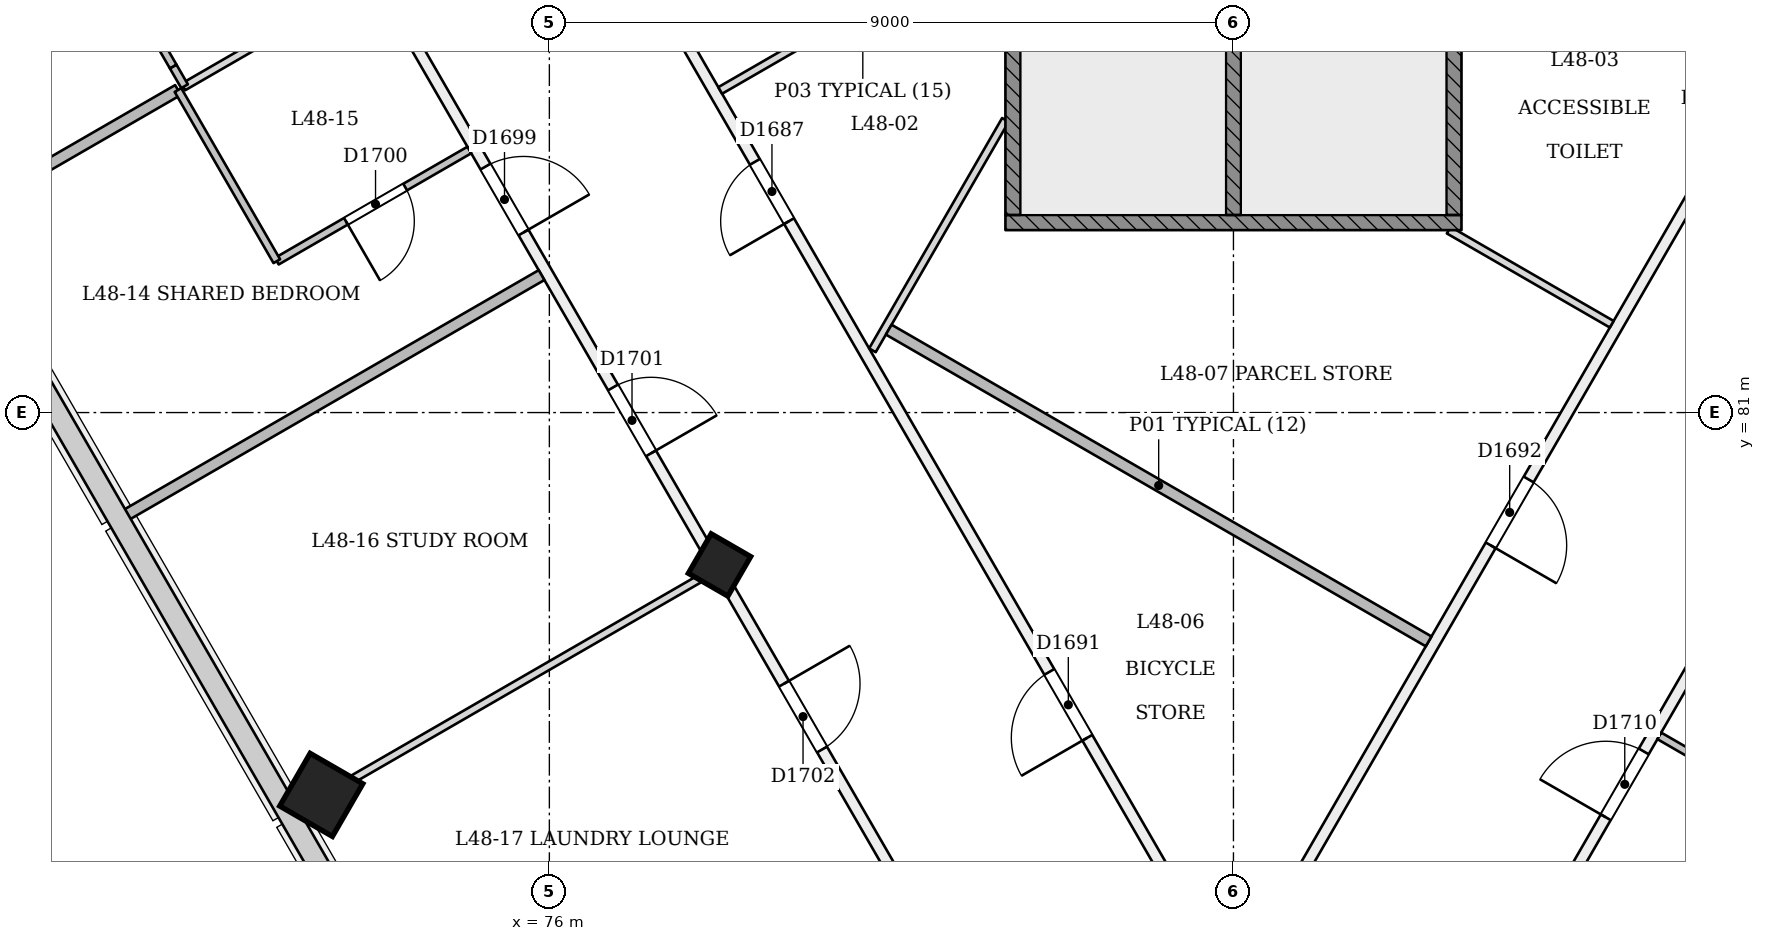
"""IFC4 building model, lengths in metres.
Left out: names, types, materials, properties, quantities, classifications, styles, units other than length and angle.
Written with IfcOpenShell. Run it as: python <this file> out.ifc"""

import sys

from ifc_helpers import new_model, si_unit, direction, frame, frame_2d, origin, origin_2d, place, context, subcontext, project, spatial, rectangle, extrude, element, fill, save


model = new_model("IFC4")
c1 = context("Model", 3, precision=1e-05, world=origin(), true_north=direction((0.0, 1.0)))
c2 = subcontext(c1, "Body", "Model", "MODEL_VIEW")
j1 = project(units=[si_unit("LENGTHUNIT", "METRE"), si_unit("PLANEANGLEUNIT", "RADIAN")], contexts=[c1])
p1 = place(None, origin())
s1 = spatial("IfcSite", under=j1, at=p1, CompositionType="ELEMENT")
p2 = place(p1, origin())
s2 = spatial("IfcBuilding", under=s1, at=p2, CompositionType="ELEMENT")
p3 = place(p2, frame((0.0, 0.0, 185.4)))
s3 = spatial("IfcBuildingStorey", under=s2, at=p3, CompositionType="ELEMENT", Elevation=185.4)
p4 = place(p3, frame((78.212, 78.948, -0.018), z_axis=(0.022222910879, 0.038415824599, 0.999014697916), x_axis=(-0.866018645871, -0.498532312818, 0.038434855016)))
e1 = element("IfcColumn", 1, at=p4, inside=s3, PredefinedType="COLUMN", context=c2, shape_type="SweptSolid", body=[
    extrude(rectangle(XDim=0.6, YDim=0.6, at=origin_2d()), origin(), (0.0, 0.0, 1.0), 3.604),
])
p5 = place(p3, frame((72.972, 75.923, -0.024), z_axis=(0.02220780257, 0.038426228083, 0.999014633777), x_axis=(-0.8658131381, -0.498889041499, 0.038436104969)))
e2 = element("IfcColumn", 2, at=p5, inside=s3, PredefinedType="COLUMN", context=c2, shape_type="SweptSolid", body=[
    extrude(rectangle(XDim=0.8, YDim=0.8, at=origin_2d()), origin(), (0.0, 0.0, 1.0), 3.628),
])
p6 = place(p3, frame((85.0, 73.392, 0.0), z_axis=(0.0, 0.0, 1.0), x_axis=(-0.500003025806, 0.866023656828, 0.0)))
e3 = element("IfcWall", 3, at=p6, inside=s3, PredefinedType="PARTITIONING", context=c2, shape_type="SweptSolid", body=[
    extrude(rectangle(XDim=19.408, YDim=0.15, at=frame_2d((9.704, 0.0))), origin(), (0.0, 0.0, 1.0), 3.3),
])
p7 = place(p6, frame((11.693, 0.0, 0.0)))
e4 = element("IfcOpeningElement", 4, at=p7, cuts=e3, PredefinedType="OPENING", context=c2, shape_type="SweptSolid", body=[
    extrude(rectangle(XDim=0.9, YDim=2.1, at=frame_2d((0.45, 1.05))), frame((0.0, 0.085, 0.0), z_axis=(0.0, -1.0, 0.0), x_axis=(1.0, 0.0, 0.0)), (0.0, 0.0, 1.0), 0.171),
])
p8 = place(p6, frame((15.402, 0.0, 0.0)))
e5 = element("IfcOpeningElement", 5, at=p8, cuts=e3, PredefinedType="OPENING", context=c2, shape_type="SweptSolid", body=[
    extrude(rectangle(XDim=1.0, YDim=2.1, at=frame_2d((0.5, 1.05))), frame((0.0, 0.085, 0.0), z_axis=(0.0, -1.0, 0.0), x_axis=(1.0, 0.0, 0.0)), (0.0, 0.0, 1.0), 0.171),
])
p9 = place(p6, frame((3.845, 0.0, 0.0)))
e6 = element("IfcOpeningElement", 6, at=p9, cuts=e3, PredefinedType="OPENING", context=c2, shape_type="SweptSolid", body=[
    extrude(rectangle(XDim=1.0, YDim=2.1, at=frame_2d((0.5, 1.05))), frame((0.0, 0.085, 0.0), z_axis=(0.0, -1.0, 0.0), x_axis=(1.0, 0.0, 0.0)), (0.0, 0.0, 1.0), 0.171),
])
p10 = place(p3, frame((94.704, 90.2, 0.0), z_axis=(0.0, 0.0, 1.0), x_axis=(-0.500004551397, -0.866022776018, 0.0)))
e7 = element("IfcWall", 7, at=p10, inside=s3, PredefinedType="PARTITIONING", context=c2, shape_type="SweptSolid", body=[
    extrude(rectangle(XDim=19.278, YDim=0.15, at=frame_2d((9.639, 0.0))), origin(), (0.0, 0.0, 1.0), 3.3),
])
p11 = place(p10, frame((6.339, 0.0, 0.0)))
e8 = element("IfcOpeningElement", 8, at=p11, cuts=e7, PredefinedType="OPENING", context=c2, shape_type="SweptSolid", body=[
    extrude(rectangle(XDim=0.9, YDim=2.1, at=frame_2d((0.45, 1.05))), frame((0.0, 0.085, 0.0), z_axis=(0.0, -1.0, 0.0), x_axis=(1.0, 0.0, 0.0)), (0.0, 0.0, 1.0), 0.171),
])
p12 = place(p10, frame((2.541, 0.0, 0.0)))
e9 = element("IfcOpeningElement", 9, at=p12, cuts=e7, PredefinedType="OPENING", context=c2, shape_type="SweptSolid", body=[
    extrude(rectangle(XDim=1.0, YDim=2.1, at=frame_2d((0.5, 1.05))), frame((0.0, 0.085, 0.0), z_axis=(0.0, -1.0, 0.0), x_axis=(1.0, 0.0, 0.0)), (0.0, 0.0, 1.0), 0.171),
])
p13 = place(p10, frame((11.64, 0.0, 0.0)))
e10 = element("IfcOpeningElement", 10, at=p13, cuts=e7, PredefinedType="OPENING", context=c2, shape_type="SweptSolid", body=[
    extrude(rectangle(XDim=1.0, YDim=2.1, at=frame_2d((0.5, 1.05))), frame((0.0, 0.085, 0.0), z_axis=(0.0, -1.0, 0.0), x_axis=(1.0, 0.0, 0.0)), (0.0, 0.0, 1.0), 0.171),
])
p14 = place(p3, frame((71.716, 90.2, 0.0), z_axis=(0.0, 0.0, 1.0), x_axis=(0.500001662319, -0.866024444042, 0.0)))
e11 = element("IfcWall", 11, at=p14, inside=s3, PredefinedType="PARTITIONING", context=c2, shape_type="SweptSolid", body=[
    extrude(rectangle(XDim=26.492, YDim=0.15, at=frame_2d((13.246, 0.0))), origin(), (0.0, 0.0, 1.0), 2.9),
])
p15 = place(p14, frame((0.23, 0.0, 0.0)))
e12 = element("IfcOpeningElement", 12, at=p15, cuts=e11, PredefinedType="OPENING", context=c2, shape_type="SweptSolid", body=[
    extrude(rectangle(XDim=1.0, YDim=2.1, at=frame_2d((0.5, 1.05))), frame((0.0, 0.085, 0.0), z_axis=(0.0, -1.0, 0.0), x_axis=(1.0, 0.0, 0.0)), (0.0, 0.0, 1.0), 0.171),
])
p16 = place(p14, frame((6.887, 0.0, 0.0)))
e13 = element("IfcOpeningElement", 13, at=p16, cuts=e11, PredefinedType="OPENING", context=c2, shape_type="SweptSolid", body=[
    extrude(rectangle(XDim=1.0, YDim=2.1, at=frame_2d((0.5, 1.05))), frame((0.0, 0.085, 0.0), z_axis=(0.0, -1.0, 0.0), x_axis=(1.0, 0.0, 0.0)), (0.0, 0.0, 1.0), 0.171),
])
p17 = place(p14, frame((10.242, 0.0, 0.0)))
e14 = element("IfcOpeningElement", 14, at=p17, cuts=e11, PredefinedType="OPENING", context=c2, shape_type="SweptSolid", body=[
    extrude(rectangle(XDim=1.0, YDim=2.1, at=frame_2d((0.5, 1.05))), frame((0.0, 0.085, 0.0), z_axis=(0.0, -1.0, 0.0), x_axis=(1.0, 0.0, 0.0)), (0.0, 0.0, 1.0), 0.171),
])
p18 = place(p14, frame((14.742, 0.0, 0.0)))
e15 = element("IfcOpeningElement", 15, at=p18, cuts=e11, PredefinedType="OPENING", context=c2, shape_type="SweptSolid", body=[
    extrude(rectangle(XDim=1.0, YDim=2.1, at=frame_2d((0.5, 1.05))), frame((0.0, 0.085, 0.0), z_axis=(0.0, -1.0, 0.0), x_axis=(1.0, 0.0, 0.0)), (0.0, 0.0, 1.0), 0.171),
])
p19 = place(p14, frame((18.212, 0.0, 0.0)))
e16 = element("IfcOpeningElement", 16, at=p19, cuts=e11, PredefinedType="OPENING", context=c2, shape_type="SweptSolid", body=[
    extrude(rectangle(XDim=1.0, YDim=2.1, at=frame_2d((0.5, 1.05))), frame((0.0, 0.085, 0.0), z_axis=(0.0, -1.0, 0.0), x_axis=(1.0, 0.0, 0.0)), (0.0, 0.0, 1.0), 0.171),
])
p20 = place(p14, frame((24.771, 0.0, 0.0)))
e17 = element("IfcOpeningElement", 17, at=p20, cuts=e11, PredefinedType="OPENING", context=c2, shape_type="SweptSolid", body=[
    extrude(rectangle(XDim=1.0, YDim=2.1, at=frame_2d((0.5, 1.05))), frame((0.0, 0.085, 0.0), z_axis=(0.0, -1.0, 0.0), x_axis=(1.0, 0.0, 0.0)), (0.0, 0.0, 1.0), 0.171),
])
p21 = place(p3, frame((85.076, 67.323, 0.0), z_axis=(0.0, 0.0, 1.0), x_axis=(0.499999794657, 0.866025522339, 0.0)))
e18 = element("IfcWall", 18, at=p21, inside=s3, PredefinedType="PARTITIONING", context=c2, shape_type="SweptSolid", body=[
    extrude(rectangle(XDim=26.416, YDim=0.15, at=frame_2d((13.208, 0.0))), origin(), (0.0, 0.0, 1.0), 2.9),
])
p22 = place(p21, frame((0.457, 0.0, 0.0)))
e19 = element("IfcOpeningElement", 19, at=p22, cuts=e18, PredefinedType="OPENING", context=c2, shape_type="SweptSolid", body=[
    extrude(rectangle(XDim=1.2, YDim=2.1, at=frame_2d((0.6, 1.05))), frame((0.0, 0.085, 0.0), z_axis=(0.0, -1.0, 0.0), x_axis=(1.0, 0.0, 0.0)), (0.0, 0.0, 1.0), 0.171),
])
p23 = place(p21, frame((7.32, 0.0, 0.0)))
e20 = element("IfcOpeningElement", 20, at=p23, cuts=e18, PredefinedType="OPENING", context=c2, shape_type="SweptSolid", body=[
    extrude(rectangle(XDim=1.0, YDim=2.1, at=frame_2d((0.5, 1.05))), frame((0.0, 0.085, 0.0), z_axis=(0.0, -1.0, 0.0), x_axis=(1.0, 0.0, 0.0)), (0.0, 0.0, 1.0), 0.171),
])
p24 = place(p21, frame((9.645, 0.0, 0.0)))
e21 = element("IfcOpeningElement", 21, at=p24, cuts=e18, PredefinedType="OPENING", context=c2, shape_type="SweptSolid", body=[
    extrude(rectangle(XDim=1.0, YDim=2.1, at=frame_2d((0.5, 1.05))), frame((0.0, 0.085, 0.0), z_axis=(0.0, -1.0, 0.0), x_axis=(1.0, 0.0, 0.0)), (0.0, 0.0, 1.0), 0.171),
])
p25 = place(p21, frame((16.204, 0.0, 0.0)))
e22 = element("IfcOpeningElement", 22, at=p25, cuts=e18, PredefinedType="OPENING", context=c2, shape_type="SweptSolid", body=[
    extrude(rectangle(XDim=1.0, YDim=2.1, at=frame_2d((0.5, 1.05))), frame((0.0, 0.085, 0.0), z_axis=(0.0, -1.0, 0.0), x_axis=(1.0, 0.0, 0.0)), (0.0, 0.0, 1.0), 0.171),
])
p26 = place(p21, frame((18.645, 0.0, 0.0)))
e23 = element("IfcOpeningElement", 23, at=p26, cuts=e18, PredefinedType="OPENING", context=c2, shape_type="SweptSolid", body=[
    extrude(rectangle(XDim=1.0, YDim=2.1, at=frame_2d((0.5, 1.05))), frame((0.0, 0.085, 0.0), z_axis=(0.0, -1.0, 0.0), x_axis=(1.0, 0.0, 0.0)), (0.0, 0.0, 1.0), 0.171),
])
p27 = place(p21, frame((24.158, 0.0, 0.0)))
e24 = element("IfcOpeningElement", 24, at=p27, cuts=e18, PredefinedType="OPENING", context=c2, shape_type="SweptSolid", body=[
    extrude(rectangle(XDim=1.0, YDim=2.1, at=frame_2d((0.5, 1.05))), frame((0.0, 0.085, 0.0), z_axis=(0.0, -1.0, 0.0), x_axis=(1.0, 0.0, 0.0)), (0.0, 0.0, 1.0), 0.171),
])
p28 = place(p3, frame((82.0, 87.404, 0.0), z_axis=(0.0, 0.0, 1.0), x_axis=(-0.866022320763, -0.500005339912, 0.0)))
e25 = element("IfcWall", 25, at=p28, inside=s3, PredefinedType="PARTITIONING", context=c2, shape_type="SweptSolid", body=[
    extrude(rectangle(XDim=4.333, YDim=0.1, at=frame_2d((2.167, 0.0))), origin(), (0.0, 0.0, 1.0), 3.3),
])
p29 = place(p3, frame((80.25, 81.819, 0.0), z_axis=(0.0, 0.0, 1.0), x_axis=(0.499988162555, 0.866032238029, 0.0)))
e26 = element("IfcWall", 26, at=p29, inside=s3, PredefinedType="PARTITIONING", context=c2, shape_type="SweptSolid", body=[
    extrude(rectangle(XDim=3.5, YDim=0.1, at=frame_2d((1.75, 0.0))), origin(), (0.0, 0.0, 1.0), 3.3),
])
p30 = place(p3, frame((87.832, 83.4, 0.0), z_axis=(0.0, 0.0, 1.0), x_axis=(0.866019742871, -0.500009804862, 0.0)))
e27 = element("IfcWall", 27, at=p30, inside=s3, PredefinedType="PARTITIONING", context=c2, shape_type="SweptSolid", body=[
    extrude(rectangle(XDim=2.476, YDim=0.1, at=frame_2d((1.238, 0.0))), origin(), (0.0, 0.0, 1.0), 3.3),
])
p31 = place(p3, frame((87.568, 77.99, 0.0), z_axis=(0.0, 0.0, 1.0), x_axis=(-0.866018040531, 0.500012753312, 0.0)))
e28 = element("IfcWall", 28, at=p31, inside=s3, PredefinedType="PARTITIONING", context=c2, shape_type="SweptSolid", body=[
    extrude(rectangle(XDim=8.202, YDim=0.15, at=frame_2d((4.101, 0.0))), origin(), (0.0, 0.0, 1.0), 3.3),
])
p32 = place(p3, frame((71.201, 85.293, 0.0), z_axis=(0.0, 0.0, 1.0), x_axis=(-0.499816412211, 0.866131372301, 0.0)))
e29 = element("IfcWall", 29, at=p32, inside=s3, PredefinedType="PARTITIONING", context=c2, shape_type="SweptSolid", body=[
    extrude(rectangle(XDim=0.3, YDim=0.1, at=frame_2d((0.15, 0.0))), origin(), (0.0, 0.0, 1.0), 2.9),
])
p33 = place(p3, frame((71.051, 85.553, 0.0), z_axis=(0.0, 0.0, 1.0), x_axis=(-0.50002983664, 0.866008176907, 0.0)))
e30 = element("IfcWall", 30, at=p33, inside=s3, PredefinedType="PARTITIONING", context=c2, shape_type="SweptSolid", body=[
    extrude(rectangle(XDim=2.2, YDim=0.1, at=frame_2d((1.1, 0.0))), origin(), (0.0, 0.0, 1.0), 3.3),
])
p34 = place(p3, frame((68.17, 83.543, 0.0), z_axis=(0.0, 0.0, 1.0), x_axis=(0.866020560687, 0.500008388397, 0.0)))
e31 = element("IfcWall", 31, at=p34, inside=s3, PredefinedType="PARTITIONING", context=c2, shape_type="SweptSolid", body=[
    extrude(rectangle(XDim=3.4, YDim=0.15, at=frame_2d((1.7, 0.0))), origin(), (0.0, 0.0, 1.0), 2.9),
])
p35 = place(p3, frame((71.183, 85.283, 0.0), z_axis=(0.0, 0.0, 1.0), x_axis=(0.866048401274, 0.499960165064, 0.0)))
e32 = element("IfcWall", 32, at=p35, inside=s3, PredefinedType="PARTITIONING", context=c2, shape_type="SweptSolid", body=[
    extrude(rectangle(XDim=2.845, YDim=0.1, at=frame_2d((1.422, 0.0))), origin(), (0.0, 0.0, 1.0), 2.9),
])
p36 = place(p3, frame((74.947, 84.454, 0.0), z_axis=(0.0, 0.0, 1.0), x_axis=(-0.86601045545, -0.500025890382, 0.0)))
e33 = element("IfcWall", 33, at=p36, inside=s3, PredefinedType="PARTITIONING", context=c2, shape_type="SweptSolid", body=[
    extrude(rectangle(XDim=2.925, YDim=0.1, at=frame_2d((1.462, 0.0))), origin(), (0.0, 0.0, 1.0), 3.3),
])
p37 = place(p36, frame((0.975, 0.0, 0.0)))
e34 = element("IfcOpeningElement", 34, at=p37, cuts=e33, PredefinedType="OPENING", context=c2, shape_type="SweptSolid", body=[
    extrude(rectangle(XDim=0.9, YDim=2.1, at=frame_2d((0.45, 1.05))), frame((0.0, 0.061, 0.0), z_axis=(0.0, -1.0, 0.0), x_axis=(1.0, 0.0, 0.0)), (0.0, 0.0, 1.0), 0.121),
])
p38 = place(p3, frame((72.414, 82.991, 0.0), z_axis=(0.0, 0.0, 1.0), x_axis=(-0.500006934395, 0.866021400173, 0.0)))
e35 = element("IfcWall", 35, at=p38, inside=s3, PredefinedType="PARTITIONING", context=c2, shape_type="SweptSolid", body=[
    extrude(rectangle(XDim=2.6, YDim=0.1, at=frame_2d((1.3, 0.0))), origin(), (0.0, 0.0, 1.0), 2.9),
])
p39 = place(p3, frame((70.402, 79.636, 0.0), z_axis=(0.0, 0.0, 1.0), x_axis=(0.866025401434, 0.500000004071, 0.0)))
e36 = element("IfcWall", 36, at=p39, inside=s3, PredefinedType="PARTITIONING", context=c2, shape_type="SweptSolid", body=[
    extrude(rectangle(XDim=6.345, YDim=0.15, at=frame_2d((3.173, 0.0))), origin(), (0.0, 0.0, 1.0), 3.3),
])
p40 = place(p3, frame((72.67, 75.749, 0.0), z_axis=(0.0, 0.0, 1.0), x_axis=(0.866032601554, 0.49998753289, 0.0)))
e37 = element("IfcWall", 37, at=p40, inside=s3, PredefinedType="PARTITIONING", context=c2, shape_type="SweptSolid", body=[
    extrude(rectangle(XDim=6.325, YDim=0.1, at=frame_2d((3.163, 0.0))), origin(), (0.0, 0.0, 1.0), 2.9),
])
p41 = place(p3, frame((93.049, 75.334, 0.0), z_axis=(0.0, 0.0, 1.0), x_axis=(-0.866011447264, 0.500024172624, 0.0)))
e38 = element("IfcWall", 38, at=p41, inside=s3, PredefinedType="PARTITIONING", context=c2, shape_type="SweptSolid", body=[
    extrude(rectangle(XDim=2.825, YDim=0.1, at=frame_2d((1.413, 0.0))), origin(), (0.0, 0.0, 1.0), 3.3),
])
p42 = place(p3, frame((82.0, 83.5, 0.0), z_axis=(0.0, 0.0, 1.0), x_axis=(1.0, 0.0, 0.0)))
e39 = element("IfcWall", 39, at=p42, inside=s3, PredefinedType="SOLIDWALL", context=c2, shape_type="SweptSolid", body=[
    extrude(rectangle(XDim=6.0, YDim=0.2, at=frame_2d((3.0, 0.0))), origin(), (0.0, 0.0, 1.0), 3.3),
])
for number, where, z_axis, x_axis in (
    (40, (82.1, 83.6, 0.0), (0.0, 0.0, 1.0), (0.0, 1.0, 0.0)),
    (41, (87.9, 83.6, 0.0), (0.0, 0.0, 1.0), (0.0, 1.0, 0.0)),
    (42, (85.0, 83.6, 0.0), (0.0, 0.0, 1.0), (0.0, 1.0, 0.0)),
):
    element("IfcWall", number, at=place(p3, frame(where, z_axis=z_axis, x_axis=x_axis)), inside=s3, PredefinedType="SOLIDWALL", context=c2, shape_type="SweptSolid", body=[
        extrude(rectangle(XDim=6.8, YDim=0.2, at=frame_2d((3.4, 0.0))), origin(), (0.0, 0.0, 1.0), 3.3),
    ])
p43 = place(p7, origin())
e43 = element("IfcDoor", 43, at=p43, inside=s3, OperationType="SINGLE_SWING_LEFT", PredefinedType="NOTDEFINED", context=c2, shape_type="SweptSolid", body=[
    extrude(rectangle(XDim=0.9, YDim=2.1, at=frame_2d((0.45, 1.05))), frame((0.0, 0.025, 0.0), z_axis=(0.0, -1.0, 0.0), x_axis=(1.0, 0.0, 0.0)), (0.0, 0.0, 1.0), 0.05),
])
fill(e4, e43)
p44 = place(p9, origin())
e44 = element("IfcDoor", 44, at=p44, inside=s3, OperationType="SINGLE_SWING_LEFT", PredefinedType="NOTDEFINED", context=c2, shape_type="SweptSolid", body=[
    extrude(rectangle(XDim=1.0, YDim=2.1, at=frame_2d((0.5, 1.05))), frame((0.0, 0.025, 0.0), z_axis=(0.0, -1.0, 0.0), x_axis=(1.0, 0.0, 0.0)), (0.0, 0.0, 1.0), 0.05),
])
fill(e6, e44)
p45 = place(p13, origin())
e45 = element("IfcDoor", 45, at=p45, inside=s3, OperationType="SINGLE_SWING_RIGHT", PredefinedType="NOTDEFINED", context=c2, shape_type="SweptSolid", body=[
    extrude(rectangle(XDim=1.0, YDim=2.1, at=frame_2d((0.5, 1.05))), frame((0.0, 0.025, 0.0), z_axis=(0.0, -1.0, 0.0), x_axis=(1.0, 0.0, 0.0)), (0.0, 0.0, 1.0), 0.05),
])
fill(e10, e45)
p46 = place(p16, origin())
e46 = element("IfcDoor", 46, at=p46, inside=s3, OperationType="SINGLE_SWING_RIGHT", PredefinedType="NOTDEFINED", context=c2, shape_type="SweptSolid", body=[
    extrude(rectangle(XDim=1.0, YDim=2.1, at=frame_2d((0.5, 1.05))), frame((0.0, 0.025, 0.0), z_axis=(0.0, -1.0, 0.0), x_axis=(1.0, 0.0, 0.0)), (0.0, 0.0, 1.0), 0.05),
])
fill(e13, e46)
p47 = place(p37, origin())
e47 = element("IfcDoor", 47, at=p47, inside=s3, OperationType="SINGLE_SWING_RIGHT", PredefinedType="NOTDEFINED", context=c2, shape_type="SweptSolid", body=[
    extrude(rectangle(XDim=0.9, YDim=2.1, at=frame_2d((0.45, 1.05))), frame((0.0, 0.025, 0.0), z_axis=(0.0, -1.0, 0.0), x_axis=(1.0, 0.0, 0.0)), (0.0, 0.0, 1.0), 0.05),
])
fill(e34, e47)
p48 = place(p17, origin())
e48 = element("IfcDoor", 48, at=p48, inside=s3, OperationType="SINGLE_SWING_RIGHT", PredefinedType="NOTDEFINED", context=c2, shape_type="SweptSolid", body=[
    extrude(rectangle(XDim=1.0, YDim=2.1, at=frame_2d((0.5, 1.05))), frame((0.0, 0.025, 0.0), z_axis=(0.0, -1.0, 0.0), x_axis=(1.0, 0.0, 0.0)), (0.0, 0.0, 1.0), 0.05),
])
fill(e14, e48)
p49 = place(p18, origin())
e49 = element("IfcDoor", 49, at=p49, inside=s3, OperationType="SINGLE_SWING_LEFT", PredefinedType="NOTDEFINED", context=c2, shape_type="SweptSolid", body=[
    extrude(rectangle(XDim=1.0, YDim=2.1, at=frame_2d((0.5, 1.05))), frame((0.0, 0.025, 0.0), z_axis=(0.0, -1.0, 0.0), x_axis=(1.0, 0.0, 0.0)), (0.0, 0.0, 1.0), 0.05),
])
fill(e15, e49)
p50 = place(p24, origin())
e50 = element("IfcDoor", 50, at=p50, inside=s3, OperationType="SINGLE_SWING_LEFT", PredefinedType="NOTDEFINED", context=c2, shape_type="SweptSolid", body=[
    extrude(rectangle(XDim=1.0, YDim=2.1, at=frame_2d((0.5, 1.05))), frame((0.0, 0.025, 0.0), z_axis=(0.0, -1.0, 0.0), x_axis=(1.0, 0.0, 0.0)), (0.0, 0.0, 1.0), 0.05),
])
fill(e21, e50)
save(model, sys.argv[1])
